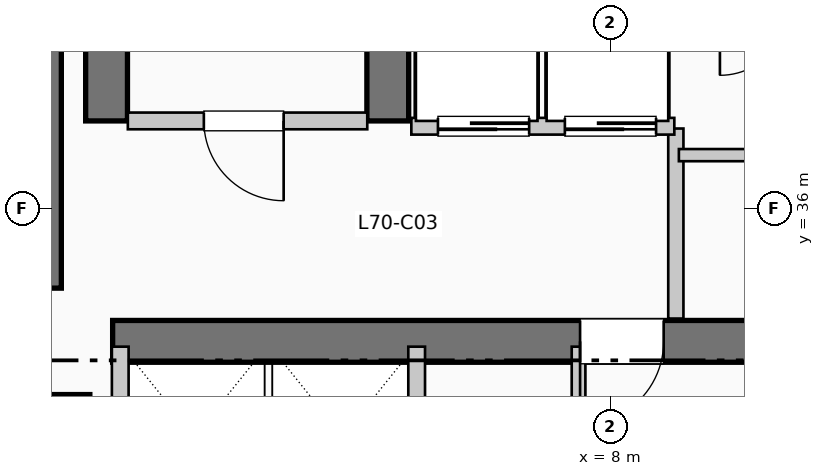
"""IFC4 building model, lengths in metres.
Left out: names, types, materials, properties, quantities, classifications, styles, units other than length and angle.
Written with IfcOpenShell. Run it as: python <this file> out.ifc"""

import sys

from ifc_helpers import new_model, si_unit, direction, frame, frame_2d, origin, origin_2d, place, context, subcontext, project, spatial, rectangle, extrude, element, fill, save


model = new_model("IFC4")
c1 = context("Model", 3, precision=1e-05, world=origin(), true_north=direction((0.0, 1.0)))
c2 = subcontext(c1, "Body", "Model", "MODEL_VIEW")
j1 = project(units=[si_unit("LENGTHUNIT", "METRE"), si_unit("PLANEANGLEUNIT", "RADIAN")], contexts=[c1])
p1 = place(None, origin())
s1 = spatial("IfcSite", under=j1, at=p1, CompositionType="ELEMENT")
p2 = place(p1, origin())
s2 = spatial("IfcBuilding", under=s1, at=p2, CompositionType="ELEMENT")
p3 = place(p2, frame((0.0, 0.0, 288.09)))
s3 = spatial("IfcBuildingStorey", under=s2, at=p3, CompositionType="ELEMENT", Elevation=288.09)
p4 = place(p3, frame((0.5, 34.95, 0.0), z_axis=(0.0, 0.0, 1.0), x_axis=(0.0, 1.0, 0.0)))
e1 = element("IfcWall", 1, at=p4, inside=s3, PredefinedType="SHEAR", context=c2, shape_type="SweptSolid", body=[
    extrude(rectangle(XDim=7.9, YDim=0.55, at=frame_2d((3.95, 0.0))), origin(), (0.0, 0.0, 1.0), 3.96),
])
p5 = place(p3, frame((1.45, 34.25, 0.0), z_axis=(0.0, 0.0, 1.0), x_axis=(1.0, 0.0, 0.0)))
e2 = element("IfcWall", 2, at=p5, inside=s3, PredefinedType="SHEAR", context=c2, shape_type="SweptSolid", body=[
    extrude(rectangle(XDim=10.71, YDim=0.55, at=frame_2d((5.355, 0.0))), origin(), (0.0, 0.0, 1.0), 3.96),
])
p6 = place(p5, frame((7.25, 0.0, 0.0), z_axis=(0.0, 0.0, 1.0), x_axis=(-1.0, 0.0, 0.0)))
e3 = element("IfcOpeningElement", 3, at=p6, cuts=e2, PredefinedType="OPENING", context=c2, shape_type="SweptSolid", body=[
    extrude(rectangle(XDim=1.1, YDim=2.15, at=frame_2d((0.55, 1.075))), frame((0.0, 0.285, 0.0), z_axis=(0.0, -1.0, 0.0), x_axis=(1.0, 0.0, 0.0)), (0.0, 0.0, 1.0), 0.57),
])
for number, where, z_axis, x_axis in (
    (4, (1.37, 37.15, 0.0), (0.0, 0.0, 1.0), (0.0, 1.0, 0.0)),
    (5, (5.07, 37.15, 0.0), (0.0, 0.0, 1.0), (0.0, 1.0, 0.0)),
):
    element("IfcWall", number, at=place(p3, frame(where, z_axis=z_axis, x_axis=x_axis)), inside=s3, PredefinedType="SHEAR", context=c2, shape_type="SweptSolid", body=[
        extrude(rectangle(XDim=7.89, YDim=0.55, at=frame_2d((3.945, 0.0))), origin(), (0.0, 0.0, 1.0), 3.96),
    ])
p7 = place(p3, frame((0.8, 33.2, 0.0), z_axis=(0.0, 0.0, 1.0), x_axis=(1.0, 0.0, 0.0)))
e6 = element("IfcColumn", 6, at=p7, inside=s3, PredefinedType="COLUMN", context=c2, shape_type="SweptSolid", body=[
    extrude(rectangle(XDim=0.7, YDim=0.7, at=origin_2d()), origin(), (0.0, 0.0, 1.0), 3.96),
])
p8 = place(p3, frame((1.65, 37.15, 0.0), z_axis=(0.0, 0.0, 1.0), x_axis=(1.0, 0.0, 0.0)))
e7 = element("IfcWall", 7, at=p8, inside=s3, PredefinedType="PARTITIONING", context=c2, shape_type="SweptSolid", body=[
    extrude(rectangle(XDim=3.15, YDim=0.22, at=frame_2d((1.575, 0.0))), origin(), (0.0, 0.0, 1.0), 3.74),
])
p9 = place(p8, frame((2.05, 0.0, 0.0), z_axis=(0.0, 0.0, 1.0), x_axis=(-1.0, 0.0, 0.0)))
e8 = element("IfcOpeningElement", 8, at=p9, cuts=e7, PredefinedType="OPENING", context=c2, shape_type="SweptSolid", body=[
    extrude(rectangle(XDim=1.05, YDim=2.15, at=frame_2d((0.525, 1.075))), frame((0.0, 0.12, 0.0), z_axis=(0.0, -1.0, 0.0), x_axis=(1.0, 0.0, 0.0)), (0.0, 0.0, 1.0), 0.24),
])
p10 = place(p3, frame((8.86, 34.55, 0.0), z_axis=(0.0, 0.0, 1.0), x_axis=(0.0, 1.0, 0.0)))
e9 = element("IfcWall", 9, at=p10, inside=s3, PredefinedType="PARTITIONING", context=c2, shape_type="SweptSolid", body=[
    extrude(rectangle(XDim=2.5, YDim=0.2, at=frame_2d((1.25, 0.0))), origin(), (0.0, 0.0, 1.0), 3.74),
])
p11 = place(p3, frame((5.38, 37.08, 0.0), z_axis=(0.0, 0.0, 1.0), x_axis=(1.0, 0.0, 0.0)))
e10 = element("IfcWall", 10, at=p11, inside=s3, PredefinedType="PARTITIONING", context=c2, shape_type="SweptSolid", body=[
    extrude(rectangle(XDim=3.46, YDim=0.22, at=frame_2d((1.73, 0.0))), origin(), (0.0, 0.0, 1.0), 3.74),
])
p12 = place(p11, frame((1.55, 0.0, 0.0), z_axis=(0.0, 0.0, 1.0), x_axis=(-1.0, 0.0, 0.0)))
e11 = element("IfcOpeningElement", 11, at=p12, cuts=e10, PredefinedType="OPENING", context=c2, shape_type="SweptSolid", body=[
    extrude(rectangle(XDim=1.2, YDim=2.2, at=frame_2d((0.6, 1.1))), frame((0.0, 0.12, 0.0), z_axis=(0.0, -1.0, 0.0), x_axis=(1.0, 0.0, 0.0)), (0.0, 0.0, 1.0), 0.24),
])
p13 = place(p11, frame((3.22, 0.0, 0.0), z_axis=(0.0, 0.0, 1.0), x_axis=(-1.0, 0.0, 0.0)))
e12 = element("IfcOpeningElement", 12, at=p13, cuts=e10, PredefinedType="OPENING", context=c2, shape_type="SweptSolid", body=[
    extrude(rectangle(XDim=1.2, YDim=2.2, at=frame_2d((0.6, 1.1))), frame((0.0, 0.12, 0.0), z_axis=(0.0, -1.0, 0.0), x_axis=(1.0, 0.0, 0.0)), (0.0, 0.0, 1.0), 0.24),
])
for number, where, z_axis, x_axis in (
    (13, (1.55, 31.8, 0.0), (0.0, 0.0, 1.0), (0.0, 1.0, 0.0)),
    (14, (5.45, 31.8, 0.0), (0.0, 0.0, 1.0), (0.0, 1.0, 0.0)),
):
    element("IfcWall", number, at=place(p3, frame(where, z_axis=z_axis, x_axis=x_axis)), inside=s3, PredefinedType="PARTITIONING", context=c2, shape_type="SweptSolid", body=[
        extrude(rectangle(XDim=2.38, YDim=0.22, at=frame_2d((1.19, 0.0))), origin(), (0.0, 0.0, 1.0), 3.74),
    ])
p14 = place(p3, frame((7.58, 31.82, 0.0), z_axis=(0.0, 0.0, 1.0), x_axis=(0.0, 1.0, 0.0)))
e15 = element("IfcWall", 15, at=p14, inside=s3, PredefinedType="PLUMBINGWALL", context=c2, shape_type="SweptSolid", body=[
    extrude(rectangle(XDim=2.36, YDim=0.18, at=frame_2d((1.18, 0.0))), origin(), (0.0, 0.0, 1.0), 3.74),
])
p15 = place(p3, frame((8.9, 36.7, 0.0), z_axis=(0.0, 0.0, 1.0), x_axis=(1.0, 0.0, 0.0)))
e16 = element("IfcWall", 16, at=p15, inside=s3, PredefinedType="PARTITIONING", context=c2, shape_type="SweptSolid", body=[
    extrude(rectangle(XDim=3.25, YDim=0.16, at=frame_2d((1.625, 0.0))), origin(), (0.0, 0.0, 1.0), 3.74),
])
p16 = place(p15, frame((1.1, 0.0, 0.0)))
e17 = element("IfcOpeningElement", 17, at=p16, cuts=e16, PredefinedType="OPENING", context=c2, shape_type="SweptSolid", body=[
    extrude(rectangle(XDim=0.95, YDim=2.15, at=frame_2d((0.475, 1.075))), frame((0.0, 0.09, 0.0), z_axis=(0.0, -1.0, 0.0), x_axis=(1.0, 0.0, 0.0)), (0.0, 0.0, 1.0), 0.18),
])
p17 = place(p9, origin())
e18 = element("IfcDoor", 18, at=p17, inside=s3, OperationType="SINGLE_SWING_RIGHT", PredefinedType="DOOR", context=c2, shape_type="SweptSolid", body=[
    extrude(rectangle(XDim=1.05, YDim=2.15, at=frame_2d((0.525, 1.075))), frame((0.0, 0.025, 0.0), z_axis=(0.0, -1.0, 0.0), x_axis=(1.0, 0.0, 0.0)), (0.0, 0.0, 1.0), 0.05),
])
fill(e8, e18)
p18 = place(p6, origin())
e19 = element("IfcDoor", 19, at=p18, inside=s3, OperationType="SINGLE_SWING_LEFT", PredefinedType="DOOR", context=c2, shape_type="SweptSolid", body=[
    extrude(rectangle(XDim=1.1, YDim=2.15, at=frame_2d((0.55, 1.075))), frame((0.0, 0.025, 0.0), z_axis=(0.0, -1.0, 0.0), x_axis=(1.0, 0.0, 0.0)), (0.0, 0.0, 1.0), 0.05),
])
fill(e3, e19)
p19 = place(p12, origin())
e20 = element("IfcDoor", 20, at=p19, inside=s3, OperationType="SLIDING_TO_RIGHT", PredefinedType="DOOR", context=c2, shape_type="SweptSolid", body=[
    extrude(rectangle(XDim=1.2, YDim=2.2, at=frame_2d((0.6, 1.1))), frame((0.0, 0.025, 0.0), z_axis=(0.0, -1.0, 0.0), x_axis=(1.0, 0.0, 0.0)), (0.0, 0.0, 1.0), 0.05),
])
fill(e11, e20)
p20 = place(p13, origin())
e21 = element("IfcDoor", 21, at=p20, inside=s3, OperationType="SLIDING_TO_RIGHT", PredefinedType="DOOR", context=c2, shape_type="SweptSolid", body=[
    extrude(rectangle(XDim=1.2, YDim=2.2, at=frame_2d((0.6, 1.1))), frame((0.0, 0.025, 0.0), z_axis=(0.0, -1.0, 0.0), x_axis=(1.0, 0.0, 0.0)), (0.0, 0.0, 1.0), 0.05),
])
fill(e12, e21)
save(model, sys.argv[1])
